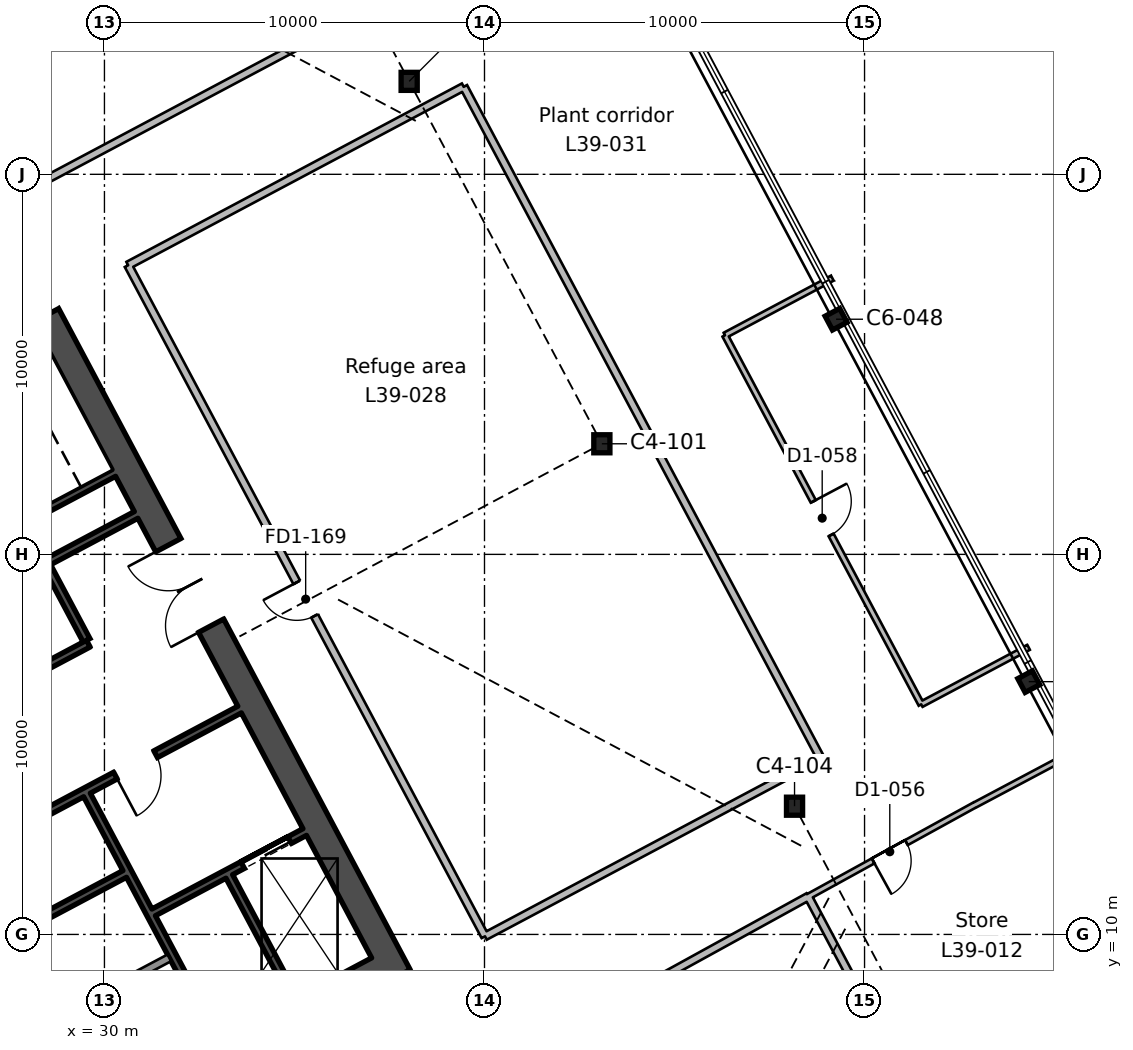
"""IFC4 building model, lengths in metres.
Left out: names, types, materials, properties, quantities, classifications, styles, units other than length and angle.
Written with IfcOpenShell. Run it as: python <this file> out.ifc"""

import sys

from ifc_helpers import new_model, si_unit, direction, frame, frame_2d, origin, origin_2d, place, context, subcontext, project, spatial, rectangle, i_section, extrude, element, fill, save


model = new_model("IFC4")
c1 = context("Model", 3, precision=1e-05, world=origin(), true_north=direction((0.0, 1.0)))
c2 = subcontext(c1, "Body", "Model", "MODEL_VIEW")
j1 = project(units=[si_unit("LENGTHUNIT", "METRE"), si_unit("PLANEANGLEUNIT", "RADIAN")], contexts=[c1])
p1 = place(None, origin())
s1 = spatial("IfcSite", under=j1, at=p1, CompositionType="ELEMENT")
p2 = place(p1, origin())
s2 = spatial("IfcBuilding", under=s1, at=p2, CompositionType="ELEMENT")
p3 = place(p2, frame((0.0, 0.0, 183.6)))
s3 = spatial("IfcBuildingStorey", under=s2, at=p3, CompositionType="ELEMENT", Elevation=183.6)
p4 = place(p3, frame((48.158, 13.374, 0.0), z_axis=(0.0, 0.0, 1.0), x_axis=(1.0, 0.0, 0.0)))
e1 = element("IfcColumn", 1, at=p4, inside=s3, PredefinedType="COLUMN", context=c2, shape_type="SweptSolid", body=[
    extrude(i_section(OverallWidth=0.424, OverallDepth=0.475, WebThickness=0.048, FlangeThickness=0.077, FilletRadius=0.015, at=origin_2d()), origin(), (0.0, 0.0, 1.0), 6.0),
])
p5 = place(p3, frame((54.321, 16.651, 0.0), z_axis=(0.0, 0.0, 1.0), x_axis=(-0.469471562786, 0.882947592859, 0.0)))
e2 = element("IfcColumn", 2, at=p5, inside=s3, PredefinedType="COLUMN", context=c2, shape_type="SweptSolid", body=[
    extrude(i_section(OverallWidth=0.412, OverallDepth=0.434, WebThickness=0.036, FlangeThickness=0.057, FilletRadius=0.015, at=origin_2d()), origin(), (0.0, 0.0, 1.0), 6.0),
])
p6 = place(p3, frame((43.088, 22.91, 0.0), z_axis=(0.0, 0.0, 1.0), x_axis=(1.0, 0.0, 0.0)))
e3 = element("IfcColumn", 3, at=p6, inside=s3, PredefinedType="COLUMN", context=c2, shape_type="SweptSolid", body=[
    extrude(i_section(OverallWidth=0.424, OverallDepth=0.475, WebThickness=0.048, FlangeThickness=0.077, FilletRadius=0.015, at=origin_2d()), origin(), (0.0, 0.0, 1.0), 6.0),
])
p7 = place(p3, frame((49.251, 26.187, 0.0), z_axis=(0.0, 0.0, 1.0), x_axis=(-0.469471562786, 0.882947592859, 0.0)))
e4 = element("IfcColumn", 4, at=p7, inside=s3, PredefinedType="COLUMN", context=c2, shape_type="SweptSolid", body=[
    extrude(i_section(OverallWidth=0.412, OverallDepth=0.434, WebThickness=0.036, FlangeThickness=0.057, FilletRadius=0.015, at=origin_2d()), origin(), (0.0, 0.0, 1.0), 6.0),
])
p8 = place(p3, frame((38.018, 32.446, 0.0), z_axis=(0.0, 0.0, 1.0), x_axis=(1.0, 0.0, 0.0)))
e5 = element("IfcColumn", 5, at=p8, inside=s3, PredefinedType="COLUMN", context=c2, shape_type="SweptSolid", body=[
    extrude(i_section(OverallWidth=0.424, OverallDepth=0.475, WebThickness=0.048, FlangeThickness=0.077, FilletRadius=0.015, at=origin_2d()), origin(), (0.0, 0.0, 1.0), 6.0),
])
p9 = place(p3, frame((37.713, 8.896, 0.0), z_axis=(0.0, 0.0, 1.0), x_axis=(-0.469469918705, 0.88294846703, 0.0)))
e6 = element("IfcWall", 6, at=p9, inside=s3, PredefinedType="SHEAR", context=c2, shape_type="SweptSolid", body=[
    extrude(rectangle(XDim=19.7, YDim=0.75, at=frame_2d((9.85, 0.0))), origin(), (0.0, 0.0, 1.0), 6.0),
])
p10 = place(p9, frame((10.45, 0.0, 0.0)))
e7 = element("IfcOpeningElement", 7, at=p10, cuts=e6, PredefinedType="OPENING", context=c2, shape_type="SweptSolid", body=[
    extrude(rectangle(XDim=2.4, YDim=2.4, at=frame_2d((1.2, 1.2))), frame((0.0, 0.385, 0.0), z_axis=(0.0, -1.0, 0.0), x_axis=(1.0, 0.0, 0.0)), (0.0, 0.0, 1.0), 0.77),
])
p11 = place(p3, frame((19.37, -0.432, 0.0), z_axis=(0.0, 0.0, 1.0), x_axis=(0.88294509198, 0.469476266226, 0.0)))
e8 = element("IfcWall", 8, at=p11, inside=s3, PredefinedType="SHEAR", context=c2, shape_type="SweptSolid", body=[
    extrude(rectangle(XDim=20.2, YDim=0.75, at=frame_2d((10.1, 0.0))), origin(), (0.0, 0.0, 1.0), 6.0),
])
p12 = place(p3, frame((32.968, 7.223, 0.0), z_axis=(0.0, 0.0, 1.0), x_axis=(-0.469480409012, 0.88294288918, 0.0)))
e9 = element("IfcWall", 9, at=p12, inside=s3, PredefinedType="SHEAR", context=c2, shape_type="SweptSolid", body=[
    extrude(rectangle(XDim=7.3, YDim=0.2, at=frame_2d((3.65, 0.0))), origin(), (0.0, 0.0, 1.0), 6.0),
])
p13 = place(p3, frame((29.528, 17.739, 0.0), z_axis=(0.0, 0.0, 1.0), x_axis=(-0.469401318492, 0.882984938828, 0.0)))
e10 = element("IfcWall", 10, at=p13, inside=s3, PredefinedType="SHEAR", context=c2, shape_type="SweptSolid", body=[
    extrude(rectangle(XDim=2.2, YDim=0.2, at=frame_2d((1.1, 0.0))), origin(), (0.0, 0.0, 1.0), 6.0),
])
p14 = place(p3, frame((34.999, 8.303, 0.0), z_axis=(0.0, 0.0, 1.0), x_axis=(-0.4694665462, 0.882950260207, 0.0)))
e11 = element("IfcWall", 11, at=p14, inside=s3, PredefinedType="SHEAR", context=c2, shape_type="SweptSolid", body=[
    extrude(rectangle(XDim=3.65, YDim=0.2, at=frame_2d((1.825, 0.0))), origin(), (0.0, 0.0, 1.0), 6.0),
])
p15 = place(p3, frame((27.115, 6.942, 0.0), z_axis=(0.0, 0.0, 1.0), x_axis=(0.882934506056, 0.469496174655, 0.0)))
e12 = element("IfcWall", 12, at=p15, inside=s3, PredefinedType="SOLIDWALL", context=c2, shape_type="SweptSolid", body=[
    extrude(rectangle(XDim=5.2, YDim=0.2, at=frame_2d((2.6, 0.0))), origin(), (0.0, 0.0, 1.0), 6.0),
])
p16 = place(p3, frame((31.296, 10.581, 0.0), z_axis=(0.0, 0.0, 1.0), x_axis=(0.882960433586, 0.469447412093, 0.0)))
e13 = element("IfcWall", 13, at=p16, inside=s3, PredefinedType="SHEAR", context=c2, shape_type="SweptSolid", body=[
    extrude(rectangle(XDim=4.5, YDim=0.2, at=frame_2d((2.25, 0.0))), origin(), (0.0, 0.0, 1.0), 6.0),
])
p17 = place(p16, frame((2.65, 0.0, 0.0)))
e14 = element("IfcOpeningElement", 14, at=p17, cuts=e13, PredefinedType="OPENING", context=c2, shape_type="SweptSolid", body=[
    extrude(rectangle(XDim=1.4, YDim=2.4, at=frame_2d((0.7, 1.2))), frame((0.0, 0.11, 0.0), z_axis=(0.0, -1.0, 0.0), x_axis=(1.0, 0.0, 0.0)), (0.0, 0.0, 1.0), 0.22),
])
p18 = place(p3, frame((25.941, 9.15, 0.0), z_axis=(0.0, 0.0, 1.0), x_axis=(0.882953967957, 0.469459572775, 0.0)))
e15 = element("IfcWall", 15, at=p18, inside=s3, PredefinedType="SHEAR", context=c2, shape_type="SweptSolid", body=[
    extrude(rectangle(XDim=5.2, YDim=0.2, at=frame_2d((2.6, 0.0))), origin(), (0.0, 0.0, 1.0), 6.0),
])
p19 = place(p3, frame((24.726, 11.222, 0.0), z_axis=(0.0, 0.0, 1.0), x_axis=(0.882940221191, 0.469485426614, 0.0)))
e16 = element("IfcWall", 16, at=p19, inside=s3, PredefinedType="SHEAR", context=c2, shape_type="SweptSolid", body=[
    extrude(rectangle(XDim=10.0, YDim=0.2, at=frame_2d((5.0, 0.0))), origin(), (0.0, 0.0, 1.0), 6.0),
])
p20 = place(p19, frame((6.3, 0.0, 0.0)))
e17 = element("IfcOpeningElement", 17, at=p20, cuts=e16, PredefinedType="OPENING", context=c2, shape_type="SweptSolid", body=[
    extrude(rectangle(XDim=1.2, YDim=2.1, at=frame_2d((0.6, 1.05))), frame((0.0, 0.11, 0.0), z_axis=(0.0, -1.0, 0.0), x_axis=(1.0, 0.0, 0.0)), (0.0, 0.0, 1.0), 0.22),
])
p21 = place(p19, frame((0.36, 0.0, 0.0)))
e18 = element("IfcOpeningElement", 18, at=p21, cuts=e16, PredefinedType="OPENING", context=c2, shape_type="SweptSolid", body=[
    extrude(rectangle(XDim=0.9, YDim=2.1, at=frame_2d((0.45, 1.05))), frame((0.0, 0.11, 0.0), z_axis=(0.0, -1.0, 0.0), x_axis=(1.0, 0.0, 0.0)), (0.0, 0.0, 1.0), 0.22),
])
p22 = place(p19, frame((3.06, 0.0, 0.0)))
e19 = element("IfcOpeningElement", 19, at=p22, cuts=e16, PredefinedType="OPENING", context=c2, shape_type="SweptSolid", body=[
    extrude(rectangle(XDim=0.9, YDim=2.1, at=frame_2d((0.45, 1.05))), frame((0.0, 0.11, 0.0), z_axis=(0.0, -1.0, 0.0), x_axis=(1.0, 0.0, 0.0)), (0.0, 0.0, 1.0), 0.22),
])
p23 = place(p3, frame((24.807, 15.116, 0.0), z_axis=(0.0, 0.0, 1.0), x_axis=(0.882942972946, 0.469480251476, 0.0)))
e20 = element("IfcWall", 20, at=p23, inside=s3, PredefinedType="SHEAR", context=c2, shape_type="SweptSolid", body=[
    extrude(rectangle(XDim=5.4, YDim=0.2, at=frame_2d((2.7, 0.0))), origin(), (0.0, 0.0, 1.0), 6.0),
])
p24 = place(p3, frame((23.769, 17.282, 0.0), z_axis=(0.0, 0.0, 1.0), x_axis=(0.882940221191, 0.469485426614, 0.0)))
e21 = element("IfcWall", 21, at=p24, inside=s3, PredefinedType="SHEAR", context=c2, shape_type="SweptSolid", body=[
    extrude(rectangle(XDim=8.0, YDim=0.2, at=frame_2d((4.0, 0.0))), origin(), (0.0, 0.0, 1.0), 6.0),
])
p25 = place(p3, frame((23.182, 18.385, 0.0), z_axis=(0.0, 0.0, 1.0), x_axis=(0.88295287151, 0.469461634952, 0.0)))
e22 = element("IfcWall", 22, at=p25, inside=s3, PredefinedType="SHEAR", context=c2, shape_type="SweptSolid", body=[
    extrude(rectangle(XDim=8.0, YDim=0.2, at=frame_2d((4.0, 0.0))), origin(), (0.0, 0.0, 1.0), 6.0),
])
p26 = place(p3, frame((0.0, 14.723, 0.0), z_axis=(0.0, 0.0, 1.0), x_axis=(0.882950329887, 0.469466415149, 0.0)))
e23 = element("IfcWall", 23, at=p26, inside=s3, PredefinedType="PARTITIONING", context=c2, shape_type="SweptSolid", body=[
    extrude(rectangle(XDim=49.288, YDim=0.2, at=frame_2d((24.644, 0.0))), origin(), (0.0, 0.0, 1.0), 5.55),
])
p27 = place(p26, frame((23.95, 0.0, 0.0)))
e24 = element("IfcOpeningElement", 24, at=p27, cuts=e23, PredefinedType="OPENING", context=c2, shape_type="SweptSolid", body=[
    extrude(rectangle(XDim=1.0, YDim=2.1, at=frame_2d((0.5, 1.05))), frame((0.0, 0.11, 0.0), z_axis=(0.0, -1.0, 0.0), x_axis=(1.0, 0.0, 0.0)), (0.0, 0.0, 1.0), 0.22),
])
p28 = place(p26, frame((17.95, 0.0, 0.0)))
e25 = element("IfcOpeningElement", 25, at=p28, cuts=e23, PredefinedType="OPENING", context=c2, shape_type="SweptSolid", body=[
    extrude(rectangle(XDim=1.0, YDim=2.1, at=frame_2d((0.5, 1.05))), frame((0.0, 0.11, 0.0), z_axis=(0.0, -1.0, 0.0), x_axis=(1.0, 0.0, 0.0)), (0.0, 0.0, 1.0), 0.22),
])
p29 = place(p26, frame((13.55, 0.0, 0.0)))
e26 = element("IfcOpeningElement", 26, at=p29, cuts=e23, PredefinedType="OPENING", context=c2, shape_type="SweptSolid", body=[
    extrude(rectangle(XDim=1.0, YDim=2.1, at=frame_2d((0.5, 1.05))), frame((0.0, 0.11, 0.0), z_axis=(0.0, -1.0, 0.0), x_axis=(1.0, 0.0, 0.0)), (0.0, 0.0, 1.0), 0.22),
])
p30 = place(p3, frame((48.518, 10.994, 0.0), z_axis=(0.0, 0.0, 1.0), x_axis=(-0.876059599613, -0.482202838986, 0.0)))
e27 = element("IfcWall", 27, at=p30, inside=s3, PredefinedType="PARTITIONING", context=c2, shape_type="SweptSolid", body=[
    extrude(rectangle(XDim=41.2, YDim=0.2, at=frame_2d((20.6, 0.0))), origin(), (0.0, 0.0, 1.0), 5.55),
])
p31 = place(p30, frame((35.651, 0.0, 0.0)))
e28 = element("IfcOpeningElement", 28, at=p31, cuts=e27, PredefinedType="OPENING", context=c2, shape_type="SweptSolid", body=[
    extrude(rectangle(XDim=1.0, YDim=2.1, at=frame_2d((0.5, 1.05))), frame((0.0, 0.11, 0.0), z_axis=(0.0, -1.0, 0.0), x_axis=(1.0, 0.0, 0.0)), (0.0, 0.0, 1.0), 0.22),
])
p32 = place(p30, frame((25.35, 0.0, 0.0)))
e29 = element("IfcOpeningElement", 29, at=p32, cuts=e27, PredefinedType="OPENING", context=c2, shape_type="SweptSolid", body=[
    extrude(rectangle(XDim=1.0, YDim=2.1, at=frame_2d((0.5, 1.05))), frame((0.0, 0.11, 0.0), z_axis=(0.0, -1.0, 0.0), x_axis=(1.0, 0.0, 0.0)), (0.0, 0.0, 1.0), 0.22),
])
p33 = place(p30, frame((20.151, 0.0, 0.0)))
e30 = element("IfcOpeningElement", 30, at=p33, cuts=e27, PredefinedType="OPENING", context=c2, shape_type="SweptSolid", body=[
    extrude(rectangle(XDim=1.0, YDim=2.1, at=frame_2d((0.5, 1.05))), frame((0.0, 0.11, 0.0), z_axis=(0.0, -1.0, 0.0), x_axis=(1.0, 0.0, 0.0)), (0.0, 0.0, 1.0), 0.22),
])
p34 = place(p30, frame((18.55, 0.0, 0.0)))
e31 = element("IfcOpeningElement", 31, at=p34, cuts=e27, PredefinedType="OPENING", context=c2, shape_type="SweptSolid", body=[
    extrude(rectangle(XDim=1.0, YDim=2.1, at=frame_2d((0.5, 1.05))), frame((0.0, 0.11, 0.0), z_axis=(0.0, -1.0, 0.0), x_axis=(1.0, 0.0, 0.0)), (0.0, 0.0, 1.0), 0.22),
])
p35 = place(p3, frame((48.518, 10.994, 0.0), z_axis=(0.0, 0.0, 1.0), x_axis=(0.469396939258, -0.882987266848, 0.0)))
e32 = element("IfcWall", 32, at=p35, inside=s3, PredefinedType="PARTITIONING", context=c2, shape_type="SweptSolid", body=[
    extrude(rectangle(XDim=6.129, YDim=0.2, at=frame_2d((3.064, 0.0))), origin(), (0.0, 0.0, 1.0), 5.55),
])
p36 = place(p3, frame((55.725, 14.905, 0.0), z_axis=(0.0, 0.0, 1.0), x_axis=(-0.883102890865, -0.469179373105, 0.0)))
e33 = element("IfcWall", 33, at=p36, inside=s3, PredefinedType="PARTITIONING", context=c2, shape_type="SweptSolid", body=[
    extrude(rectangle(XDim=3.203, YDim=0.15, at=frame_2d((1.602, 0.0))), origin(), (0.0, 0.0, 1.0), 5.55),
])
p37 = place(p3, frame((48.518, 10.994, 0.0), z_axis=(0.0, 0.0, 1.0), x_axis=(0.875930982576, 0.482436434947, 0.0)))
e34 = element("IfcWall", 34, at=p37, inside=s3, PredefinedType="PARTITIONING", context=c2, shape_type="SweptSolid", body=[
    extrude(rectangle(XDim=4.996, YDim=0.15, at=frame_2d((2.498, 0.0))), origin(), (0.0, 0.0, 1.0), 5.55),
])
p38 = place(p37, frame((1.95, 0.0, 0.0)))
e35 = element("IfcOpeningElement", 35, at=p38, cuts=e34, PredefinedType="OPENING", context=c2, shape_type="SweptSolid", body=[
    extrude(rectangle(XDim=1.0, YDim=2.1, at=frame_2d((0.5, 1.05))), frame((0.0, 0.085, 0.0), z_axis=(0.0, -1.0, 0.0), x_axis=(1.0, 0.0, 0.0)), (0.0, 0.0, 1.0), 0.17),
])
p39 = place(p3, frame((49.152, 27.268, 0.0), z_axis=(0.0, 0.0, 1.0), x_axis=(-0.882819217955, -0.469712921271, 0.0)))
e36 = element("IfcWall", 36, at=p39, inside=s3, PredefinedType="PARTITIONING", context=c2, shape_type="SweptSolid", body=[
    extrude(rectangle(XDim=3.2, YDim=0.15, at=frame_2d((1.6, 0.0))), origin(), (0.0, 0.0, 1.0), 5.55),
])
p40 = place(p3, frame((46.327, 25.765, 0.0), z_axis=(0.0, 0.0, 1.0), x_axis=(0.469481924316, -0.882942083458, 0.0)))
e37 = element("IfcWall", 37, at=p40, inside=s3, PredefinedType="PARTITIONING", context=c2, shape_type="SweptSolid", body=[
    extrude(rectangle(XDim=11.0, YDim=0.15, at=frame_2d((5.5, 0.0))), origin(), (0.0, 0.0, 1.0), 5.55),
])
p41 = place(p40, frame((4.95, 0.0, 0.0)))
e38 = element("IfcOpeningElement", 38, at=p41, cuts=e37, PredefinedType="OPENING", context=c2, shape_type="SweptSolid", body=[
    extrude(rectangle(XDim=1.0, YDim=2.1, at=frame_2d((0.5, 1.05))), frame((0.0, 0.085, 0.0), z_axis=(0.0, -1.0, 0.0), x_axis=(1.0, 0.0, 0.0)), (0.0, 0.0, 1.0), 0.17),
])
p42 = place(p3, frame((51.491, 16.053, 0.0), z_axis=(0.0, 0.0, 1.0), x_axis=(0.882960556025, 0.469447181805, 0.0)))
e39 = element("IfcWall", 39, at=p42, inside=s3, PredefinedType="PARTITIONING", context=c2, shape_type="SweptSolid", body=[
    extrude(rectangle(XDim=3.199, YDim=0.15, at=frame_2d((1.6, 0.0))), origin(), (0.0, 0.0, 1.0), 5.55),
])
p43 = place(p3, frame((30.623, 27.608, 0.0), z_axis=(0.0, 0.0, 1.0), x_axis=(0.882940863385, 0.469484218867, 0.0)))
e40 = element("IfcWall", 40, at=p43, inside=s3, PredefinedType="PARTITIONING", context=c2, shape_type="SweptSolid", body=[
    extrude(rectangle(XDim=10.0, YDim=0.2, at=frame_2d((5.0, 0.0))), origin(), (0.0, 0.0, 1.0), 5.55),
])
p44 = place(p3, frame((39.453, 32.303, 0.0), z_axis=(0.0, 0.0, 1.0), x_axis=(0.469461333319, -0.882953031887, 0.0)))
e41 = element("IfcWall", 41, at=p44, inside=s3, PredefinedType="PARTITIONING", context=c2, shape_type="SweptSolid", body=[
    extrude(rectangle(XDim=20.0, YDim=0.2, at=frame_2d((10.0, 0.0))), origin(), (0.0, 0.0, 1.0), 5.55),
])
p45 = place(p3, frame((48.842, 14.644, 0.0), z_axis=(0.0, 0.0, 1.0), x_axis=(-0.882924718888, -0.46951457994, 0.0)))
e42 = element("IfcWall", 42, at=p45, inside=s3, PredefinedType="PARTITIONING", context=c2, shape_type="SweptSolid", body=[
    extrude(rectangle(XDim=10.0, YDim=0.2, at=frame_2d((5.0, 0.0))), origin(), (0.0, 0.0, 1.0), 5.55),
])
p46 = place(p3, frame((40.013, 9.949, 0.0), z_axis=(0.0, 0.0, 1.0), x_axis=(-0.469489882812, 0.882937851685, 0.0)))
e43 = element("IfcWall", 43, at=p46, inside=s3, PredefinedType="PARTITIONING", context=c2, shape_type="SweptSolid", body=[
    extrude(rectangle(XDim=20.0, YDim=0.2, at=frame_2d((10.0, 0.0))), origin(), (0.0, 0.0, 1.0), 5.55),
])
p47 = place(p46, frame((9.55, 0.0, 0.0)))
e44 = element("IfcOpeningElement", 44, at=p47, cuts=e43, PredefinedType="OPENING", context=c2, shape_type="SweptSolid", body=[
    extrude(rectangle(XDim=1.0, YDim=2.1, at=frame_2d((0.5, 1.05))), frame((0.0, 0.11, 0.0), z_axis=(0.0, -1.0, 0.0), x_axis=(1.0, 0.0, 0.0)), (0.0, 0.0, 1.0), 0.22),
])
p48 = place(p10, origin())
e45 = element("IfcDoor", 45, at=p48, inside=s3, OperationType="DOUBLE_DOOR_SINGLE_SWING", PredefinedType="DOOR", context=c2, shape_type="SweptSolid", body=[
    extrude(rectangle(XDim=2.4, YDim=2.4, at=frame_2d((1.2, 1.2))), frame((0.0, 0.025, 0.0), z_axis=(0.0, -1.0, 0.0), x_axis=(1.0, 0.0, 0.0)), (0.0, 0.0, 1.0), 0.05),
])
fill(e7, e45)
p49 = place(p20, frame((1.2, 0.0, 0.0), z_axis=(0.0, 0.0, 1.0), x_axis=(-1.0, 0.0, 0.0)))
e46 = element("IfcDoor", 46, at=p49, inside=s3, OperationType="SINGLE_SWING_RIGHT", PredefinedType="DOOR", context=c2, shape_type="SweptSolid", body=[
    extrude(rectangle(XDim=1.2, YDim=2.1, at=frame_2d((0.6, 1.05))), frame((0.0, 0.025, 0.0), z_axis=(0.0, -1.0, 0.0), x_axis=(1.0, 0.0, 0.0)), (0.0, 0.0, 1.0), 0.05),
])
fill(e17, e46)
p50 = place(p17, origin())
e47 = element("IfcDoor", 47, at=p50, inside=s3, OperationType="DOUBLE_DOOR_SLIDING", PredefinedType="DOOR", context=c2, shape_type="SweptSolid", body=[
    extrude(rectangle(XDim=1.4, YDim=2.4, at=frame_2d((0.7, 1.2))), frame((0.0, 0.025, 0.0), z_axis=(0.0, -1.0, 0.0), x_axis=(1.0, 0.0, 0.0)), (0.0, 0.0, 1.0), 0.05),
])
fill(e14, e47)
p51 = place(p38, frame((1.0, 0.0, 0.0), z_axis=(0.0, 0.0, 1.0), x_axis=(-1.0, 0.0, 0.0)))
e48 = element("IfcDoor", 48, at=p51, inside=s3, OperationType="SINGLE_SWING_RIGHT", PredefinedType="DOOR", context=c2, shape_type="SweptSolid", body=[
    extrude(rectangle(XDim=1.0, YDim=2.1, at=frame_2d((0.5, 1.05))), frame((0.0, 0.025, 0.0), z_axis=(0.0, -1.0, 0.0), x_axis=(1.0, 0.0, 0.0)), (0.0, 0.0, 1.0), 0.05),
])
fill(e35, e48)
p52 = place(p47, origin())
e49 = element("IfcDoor", 49, at=p52, inside=s3, OperationType="SINGLE_SWING_RIGHT", PredefinedType="DOOR", context=c2, shape_type="SweptSolid", body=[
    extrude(rectangle(XDim=1.0, YDim=2.1, at=frame_2d((0.5, 1.05))), frame((0.0, 0.025, 0.0), z_axis=(0.0, -1.0, 0.0), x_axis=(1.0, 0.0, 0.0)), (0.0, 0.0, 1.0), 0.05),
])
fill(e44, e49)
p53 = place(p41, origin())
e50 = element("IfcDoor", 50, at=p53, inside=s3, OperationType="SINGLE_SWING_LEFT", PredefinedType="DOOR", context=c2, shape_type="SweptSolid", body=[
    extrude(rectangle(XDim=1.0, YDim=2.1, at=frame_2d((0.5, 1.05))), frame((0.0, 0.025, 0.0), z_axis=(0.0, -1.0, 0.0), x_axis=(1.0, 0.0, 0.0)), (0.0, 0.0, 1.0), 0.05),
])
fill(e38, e50)
save(model, sys.argv[1])
